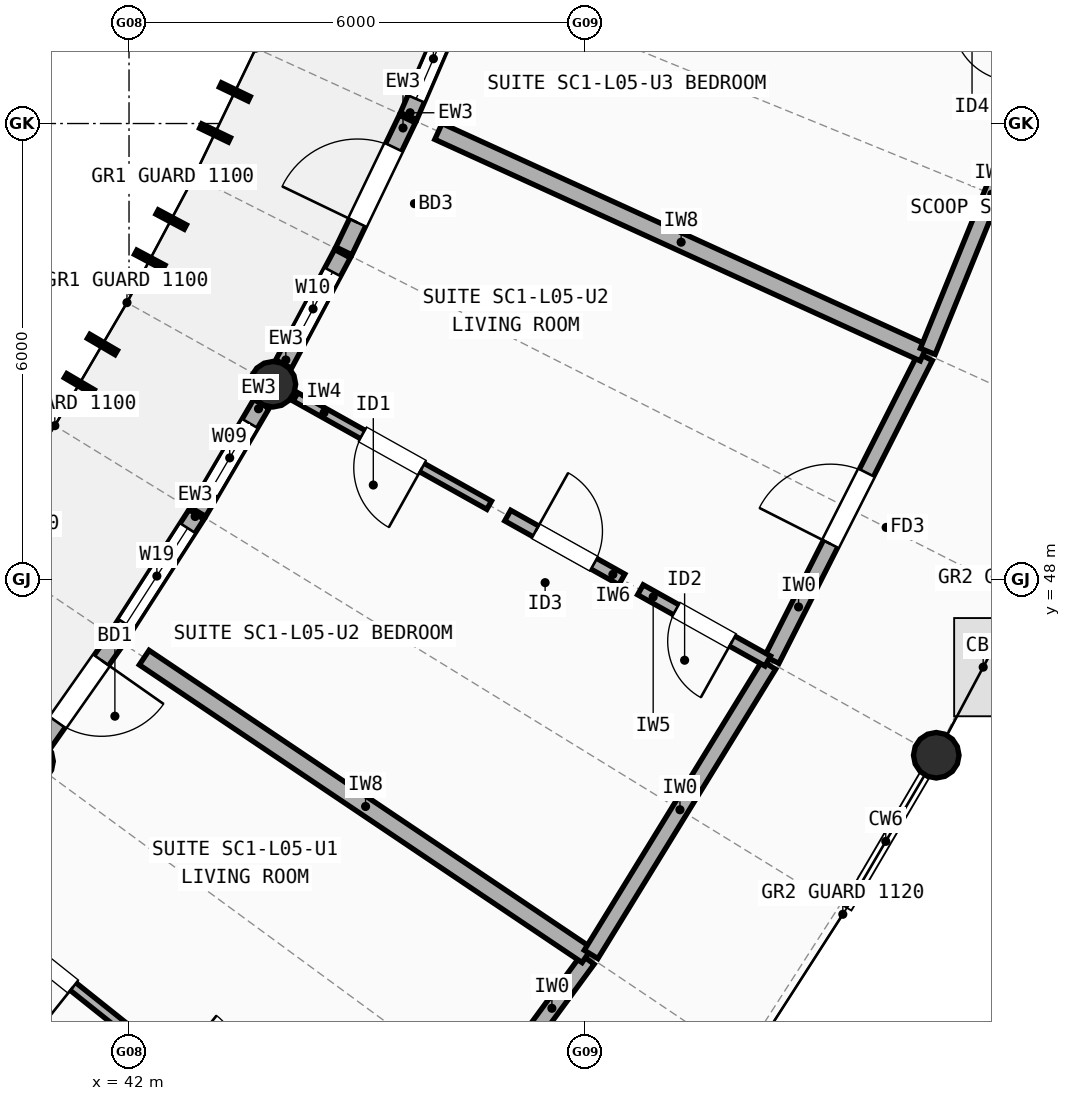
"""IFC4 building model, lengths in metres.
Left out: names, types, materials, properties, quantities, classifications, styles, units other than length and angle.
Written with IfcOpenShell. Run it as: python <this file> out.ifc"""

import sys

from ifc_helpers import new_model, si_unit, direction, frame, frame_2d, origin, origin_2d, place, context, subcontext, project, spatial, rectangle, circle, extrude, element, fill, save


model = new_model("IFC4")
c1 = context("Model", 3, precision=1e-05, world=origin(), true_north=direction((0.0, 1.0)))
c2 = subcontext(c1, "Body", "Model", "MODEL_VIEW")
j1 = project(units=[si_unit("LENGTHUNIT", "METRE"), si_unit("PLANEANGLEUNIT", "RADIAN")], contexts=[c1])
p1 = place(None, origin())
s1 = spatial("IfcSite", under=j1, at=p1, CompositionType="ELEMENT")
p2 = place(p1, origin())
s2 = spatial("IfcBuilding", under=s1, at=p2, CompositionType="ELEMENT")
p3 = place(p2, frame((0.0, 0.0, 17.3)))
s3 = spatial("IfcBuildingStorey", under=s2, at=p3, CompositionType="ELEMENT", Elevation=17.3)
for number, where, z_axis, x_axis in (
    (1, (40.704, 45.61, 0.0), (0.0, 0.0, 1.0), (1.0, 0.0, 0.0)),
    (2, (43.893, 50.57, 0.0), (0.0, 0.0, 1.0), (1.0, 0.0, 0.0)),
    (3, (52.621, 45.689, 0.0), (0.0, 0.0, 1.0), (1.0, 0.0, 0.0)),
):
    element("IfcColumn", number, at=place(p3, frame(where, z_axis=z_axis, x_axis=x_axis)), inside=s3, PredefinedType="COLUMN", context=c2, shape_type="SweptSolid", body=[
        extrude(circle(Radius=0.3, at=origin_2d()), origin(), (0.0, 0.0, 1.0), 2.94),
    ])
p4 = place(p3, frame((40.876, 45.855, 0.0), z_axis=(0.0, 0.0, 1.0), x_axis=(0.574755063072, 0.818325496043, 0.0)))
e4 = element("IfcWall", 4, at=p4, inside=s3, PredefinedType="STANDARD", context=c2, shape_type="SweptSolid", body=[
    extrude(rectangle(XDim=1.647, YDim=0.235, at=frame_2d((0.823, 0.0))), origin(), (0.0, 0.0, 1.0), 2.676),
])
p5 = place(p4, frame((0.323, 0.0, 0.0)))
e5 = element("IfcOpeningElement", 5, at=p5, cuts=e4, PredefinedType="OPENING", context=c2, shape_type="SweptSolid", body=[
    extrude(rectangle(XDim=1.0, YDim=2.15, at=frame_2d((0.5, 1.075))), frame((0.0, 0.127, 0.0), z_axis=(0.0, -1.0, 0.0), x_axis=(1.0, 0.0, 0.0)), (0.0, 0.0, 1.0), 0.255),
])
p6 = place(p3, frame((41.845, 47.236, 0.0), z_axis=(0.0, 0.0, 1.0), x_axis=(0.540911277163, 0.841079657486, 0.0)))
e6 = element("IfcWall", 6, at=p6, inside=s3, PredefinedType="STANDARD", context=c2, shape_type="SweptSolid", body=[
    extrude(rectangle(XDim=1.927, YDim=0.235, at=frame_2d((0.963, 0.0))), origin(), (0.0, 0.0, 1.0), 2.676),
])
p7 = place(p6, frame((0.213, 0.0, 0.85)))
e7 = element("IfcOpeningElement", 7, at=p7, cuts=e6, PredefinedType="OPENING", context=c2, shape_type="SweptSolid", body=[
    extrude(rectangle(XDim=1.5, YDim=1.5, at=frame_2d((0.75, 0.75))), frame((0.0, 0.127, 0.0), z_axis=(0.0, -1.0, 0.0), x_axis=(1.0, 0.0, 0.0)), (0.0, 0.0, 1.0), 0.255),
])
p8 = place(p3, frame((42.908, 48.891, 0.0), z_axis=(0.0, 0.0, 1.0), x_axis=(0.505879302059, 0.862604272971, 0.0)))
e8 = element("IfcWall", 8, at=p8, inside=s3, PredefinedType="STANDARD", context=c2, shape_type="SweptSolid", body=[
    extrude(rectangle(XDim=1.647, YDim=0.235, at=frame_2d((0.823, 0.0))), origin(), (0.0, 0.0, 1.0), 2.676),
])
p9 = place(p8, frame((0.298, 0.0, 0.85)))
e9 = element("IfcOpeningElement", 9, at=p9, cuts=e8, PredefinedType="OPENING", context=c2, shape_type="SweptSolid", body=[
    extrude(rectangle(XDim=1.05, YDim=1.35, at=frame_2d((0.525, 0.675))), frame((0.0, 0.127, 0.0), z_axis=(0.0, -1.0, 0.0), x_axis=(1.0, 0.0, 0.0)), (0.0, 0.0, 1.0), 0.255),
])
p10 = place(p3, frame((44.034, 50.835, 0.0), z_axis=(0.0, 0.0, 1.0), x_axis=(0.470134157171, 0.882594966143, 0.0)))
e10 = element("IfcWall", 10, at=p10, inside=s3, PredefinedType="STANDARD", context=c2, shape_type="SweptSolid", body=[
    extrude(rectangle(XDim=1.647, YDim=0.235, at=frame_2d((0.823, 0.0))), origin(), (0.0, 0.0, 1.0), 2.676),
])
p11 = place(p10, frame((0.273, 0.0, 0.85)))
e11 = element("IfcOpeningElement", 11, at=p11, cuts=e10, PredefinedType="OPENING", context=c2, shape_type="SweptSolid", body=[
    extrude(rectangle(XDim=1.1, YDim=1.45, at=frame_2d((0.55, 0.725))), frame((0.0, 0.127, 0.0), z_axis=(0.0, -1.0, 0.0), x_axis=(1.0, 0.0, 0.0)), (0.0, 0.0, 1.0), 0.255),
])
p12 = place(p3, frame((44.826, 52.324, 0.0), z_axis=(0.0, 0.0, 1.0), x_axis=(0.433579410465, 0.90111536155, 0.0)))
e12 = element("IfcWall", 12, at=p12, inside=s3, PredefinedType="STANDARD", context=c2, shape_type="SweptSolid", body=[
    extrude(rectangle(XDim=1.927, YDim=0.235, at=frame_2d((0.963, 0.0))), origin(), (0.0, 0.0, 1.0), 2.676),
])
p13 = place(p12, frame((0.413, 0.0, 0.0)))
e13 = element("IfcOpeningElement", 13, at=p13, cuts=e12, PredefinedType="OPENING", context=c2, shape_type="SweptSolid", body=[
    extrude(rectangle(XDim=1.1, YDim=2.15, at=frame_2d((0.55, 1.075))), frame((0.0, 0.127, 0.0), z_axis=(0.0, -1.0, 0.0), x_axis=(1.0, 0.0, 0.0)), (0.0, 0.0, 1.0), 0.255),
])
p14 = place(p3, frame((45.678, 54.097, 0.0), z_axis=(0.0, 0.0, 1.0), x_axis=(0.396333765494, 0.918106500538, 0.0)))
e14 = element("IfcWall", 14, at=p14, inside=s3, PredefinedType="STANDARD", context=c2, shape_type="SweptSolid", body=[
    extrude(rectangle(XDim=1.646, YDim=0.235, at=frame_2d((0.823, 0.0))), origin(), (0.0, 0.0, 1.0), 2.676),
])
p15 = place(p14, frame((0.248, 0.0, 0.85)))
e15 = element("IfcOpeningElement", 15, at=p15, cuts=e14, PredefinedType="OPENING", context=c2, shape_type="SweptSolid", body=[
    extrude(rectangle(XDim=1.15, YDim=1.45, at=frame_2d((0.575, 0.725))), frame((0.0, 0.127, 0.0), z_axis=(0.0, -1.0, 0.0), x_axis=(1.0, 0.0, 0.0)), (0.0, 0.0, 1.0), 0.255),
])
p16 = place(p3, frame((45.393, 39.4, 0.0), z_axis=(0.0, 0.0, 1.0), x_axis=(0.591475021239, 0.806323321783, 0.0)))
e16 = element("IfcWall", 16, at=p16, inside=s3, PredefinedType="SOLIDWALL", context=c2, shape_type="SweptSolid", body=[
    extrude(rectangle(XDim=4.467, YDim=0.21, at=frame_2d((2.233, 0.0))), origin(), (0.0, 0.0, 1.0), 2.734),
])
p17 = place(p16, frame((1.743, 0.0, 0.0)))
e17 = element("IfcOpeningElement", 17, at=p17, cuts=e16, PredefinedType="OPENING", context=c2, shape_type="SweptSolid", body=[
    extrude(rectangle(XDim=0.98, YDim=2.15, at=frame_2d((0.49, 1.075))), frame((0.0, 0.115, 0.0), z_axis=(0.0, -1.0, 0.0), x_axis=(1.0, 0.0, 0.0)), (0.0, 0.0, 1.0), 0.23),
])
p18 = place(p3, frame((39.774, 43.836, 0.0), z_axis=(0.0, 0.0, 1.0), x_axis=(0.781431339385, -0.623991235377, 0.0)))
e18 = element("IfcWall", 18, at=p18, inside=s3, PredefinedType="PARTITIONING", context=c2, shape_type="SweptSolid", body=[
    extrude(rectangle(XDim=2.92, YDim=0.125, at=frame_2d((1.46, 0.0))), origin(), (0.0, 0.0, 1.0), 2.714),
])
p19 = place(p18, frame((1.01, 0.0, 0.0)))
e19 = element("IfcOpeningElement", 19, at=p19, cuts=e18, PredefinedType="OPENING", context=c2, shape_type="SweptSolid", body=[
    extrude(rectangle(XDim=0.9, YDim=2.1, at=frame_2d((0.45, 1.05))), frame((0.0, 0.073, 0.0), z_axis=(0.0, -1.0, 0.0), x_axis=(1.0, 0.0, 0.0)), (0.0, 0.0, 1.0), 0.145),
])
p20 = place(p3, frame((42.2, 46.974, 0.0), z_axis=(0.0, 0.0, 1.0), x_axis=(0.82987699708, -0.55794638606, 0.0)))
e20 = element("IfcWall", 20, at=p20, inside=s3, PredefinedType="SOLIDWALL", context=c2, shape_type="SweptSolid", body=[
    extrude(rectangle(XDim=7.02, YDim=0.23, at=frame_2d((3.51, 0.0))), origin(), (0.0, 0.0, 1.0), 2.754),
])
p21 = place(p3, frame((48.08, 43.069, 0.0), z_axis=(0.0, 0.0, 1.0), x_axis=(0.523444746739, 0.852059620632, 0.0)))
e21 = element("IfcWall", 21, at=p21, inside=s3, PredefinedType="SOLIDWALL", context=c2, shape_type="SweptSolid", body=[
    extrude(rectangle(XDim=4.467, YDim=0.21, at=frame_2d((2.234, 0.0))), origin(), (0.0, 0.0, 1.0), 2.714),
])
p22 = place(p3, frame((50.457, 46.945, 0.0), z_axis=(0.0, 0.0, 1.0), x_axis=(0.451972910967, 0.892031662976, 0.0)))
e22 = element("IfcWall", 22, at=p22, inside=s3, PredefinedType="SOLIDWALL", context=c2, shape_type="SweptSolid", body=[
    extrude(rectangle(XDim=4.467, YDim=0.21, at=frame_2d((2.234, 0.0))), origin(), (0.0, 0.0, 1.0), 2.754),
])
p23 = place(p22, frame((1.708, 0.0, 0.0)))
e23 = element("IfcOpeningElement", 23, at=p23, cuts=e22, PredefinedType="OPENING", context=c2, shape_type="SweptSolid", body=[
    extrude(rectangle(XDim=1.05, YDim=2.15, at=frame_2d((0.525, 1.075))), frame((0.0, 0.115, 0.0), z_axis=(0.0, -1.0, 0.0), x_axis=(1.0, 0.0, 0.0)), (0.0, 0.0, 1.0), 0.23),
])
p24 = place(p3, frame((44.19, 50.404, 0.0), z_axis=(0.0, 0.0, 1.0), x_axis=(0.872785313841, -0.488104287978, 0.0)))
e24 = element("IfcWall", 24, at=p24, inside=s3, PredefinedType="PARTITIONING", context=c2, shape_type="SweptSolid", body=[
    extrude(rectangle(XDim=2.92, YDim=0.125, at=frame_2d((1.46, 0.0))), origin(), (0.0, 0.0, 1.0), 2.734),
])
p25 = place(p24, frame((1.01, 0.0, 0.0)))
e25 = element("IfcOpeningElement", 25, at=p25, cuts=e24, PredefinedType="OPENING", context=c2, shape_type="SweptSolid", body=[
    extrude(rectangle(XDim=0.9, YDim=2.1, at=frame_2d((0.45, 1.05))), frame((0.0, 0.073, 0.0), z_axis=(0.0, -1.0, 0.0), x_axis=(1.0, 0.0, 0.0)), (0.0, 0.0, 1.0), 0.145),
])
p26 = place(p3, frame((46.983, 48.842, 0.0), z_axis=(0.0, 0.0, 1.0), x_axis=(0.872774545553, -0.48812354239, 0.0)))
e26 = element("IfcWall", 26, at=p26, inside=s3, PredefinedType="PLUMBINGWALL", context=c2, shape_type="SweptSolid", body=[
    extrude(rectangle(XDim=1.72, YDim=0.16, at=frame_2d((0.86, 0.0))), origin(), (0.0, 0.0, 1.0), 2.734),
])
p27 = place(p26, frame((0.42, 0.0, 0.0)))
e27 = element("IfcOpeningElement", 27, at=p27, cuts=e26, PredefinedType="OPENING", context=c2, shape_type="SweptSolid", body=[
    extrude(rectangle(XDim=0.88, YDim=2.1, at=frame_2d((0.44, 1.05))), frame((0.0, 0.09, 0.0), z_axis=(0.0, -1.0, 0.0), x_axis=(1.0, 0.0, 0.0)), (0.0, 0.0, 1.0), 0.18),
])
p28 = place(p3, frame((48.728, 47.866, 0.0), z_axis=(0.0, 0.0, 1.0), x_axis=(0.8728224149, -0.488037941198, 0.0)))
e28 = element("IfcWall", 28, at=p28, inside=s3, PredefinedType="PARTITIONING", context=c2, shape_type="SweptSolid", body=[
    extrude(rectangle(XDim=1.92, YDim=0.15, at=frame_2d((0.96, 0.0))), origin(), (0.0, 0.0, 1.0), 2.734),
])
p29 = place(p28, frame((0.535, 0.0, 0.0)))
e29 = element("IfcOpeningElement", 29, at=p29, cuts=e28, PredefinedType="OPENING", context=c2, shape_type="SweptSolid", body=[
    extrude(rectangle(XDim=0.85, YDim=2.1, at=frame_2d((0.425, 1.05))), frame((0.0, 0.085, 0.0), z_axis=(0.0, -1.0, 0.0), x_axis=(1.0, 0.0, 0.0)), (0.0, 0.0, 1.0), 0.17),
])
p30 = place(p3, frame((46.071, 53.896, 0.0), z_axis=(0.0, 0.0, 1.0), x_axis=(0.909807068599, -0.415031442095, 0.0)))
e30 = element("IfcWall", 30, at=p30, inside=s3, PredefinedType="SOLIDWALL", context=c2, shape_type="SweptSolid", body=[
    extrude(rectangle(XDim=7.02, YDim=0.23, at=frame_2d((3.51, 0.0))), origin(), (0.0, 0.0, 1.0), 2.714),
])
p31 = place(p3, frame((52.509, 51.002, 0.0), z_axis=(0.0, 0.0, 1.0), x_axis=(0.377413192487, 0.926044967665, 0.0)))
e31 = element("IfcWall", 31, at=p31, inside=s3, PredefinedType="SOLIDWALL", context=c2, shape_type="SweptSolid", body=[
    extrude(rectangle(XDim=4.467, YDim=0.21, at=frame_2d((2.234, 0.0))), origin(), (0.0, 0.0, 1.0), 2.734),
])
p32 = place(p5, origin())
e32 = element("IfcDoor", 32, at=p32, inside=s3, OperationType="SINGLE_SWING_RIGHT", PredefinedType="DOOR", context=c2, shape_type="SweptSolid", body=[
    extrude(rectangle(XDim=1.0, YDim=2.15, at=frame_2d((0.5, 1.075))), frame((0.0, 0.025, 0.0), z_axis=(0.0, -1.0, 0.0), x_axis=(1.0, 0.0, 0.0)), (0.0, 0.0, 1.0), 0.05),
])
fill(e5, e32)
p33 = place(p7, origin())
e33 = element("IfcWindow", 33, at=p33, inside=s3, PartitioningType="SINGLE_PANEL", PredefinedType="WINDOW", context=c2, shape_type="SweptSolid", body=[
    extrude(rectangle(XDim=1.5, YDim=1.5, at=frame_2d((0.75, 0.75))), frame((0.0, 0.03, 0.0), z_axis=(0.0, -1.0, 0.0), x_axis=(1.0, 0.0, 0.0)), (0.0, 0.0, 1.0), 0.06),
])
fill(e7, e33)
p34 = place(p9, origin())
e34 = element("IfcWindow", 34, at=p34, inside=s3, PartitioningType="SINGLE_PANEL", PredefinedType="WINDOW", context=c2, shape_type="SweptSolid", body=[
    extrude(rectangle(XDim=1.05, YDim=1.35, at=frame_2d((0.525, 0.675))), frame((0.0, 0.03, 0.0), z_axis=(0.0, -1.0, 0.0), x_axis=(1.0, 0.0, 0.0)), (0.0, 0.0, 1.0), 0.06),
])
fill(e9, e34)
p35 = place(p11, origin())
e35 = element("IfcWindow", 35, at=p35, inside=s3, PartitioningType="SINGLE_PANEL", PredefinedType="WINDOW", context=c2, shape_type="SweptSolid", body=[
    extrude(rectangle(XDim=1.1, YDim=1.45, at=frame_2d((0.55, 0.725))), frame((0.0, 0.03, 0.0), z_axis=(0.0, -1.0, 0.0), x_axis=(1.0, 0.0, 0.0)), (0.0, 0.0, 1.0), 0.06),
])
fill(e11, e35)
p36 = place(p13, origin())
e36 = element("IfcDoor", 36, at=p36, inside=s3, OperationType="SINGLE_SWING_LEFT", PredefinedType="DOOR", context=c2, shape_type="SweptSolid", body=[
    extrude(rectangle(XDim=1.1, YDim=2.15, at=frame_2d((0.55, 1.075))), frame((0.0, 0.025, 0.0), z_axis=(0.0, -1.0, 0.0), x_axis=(1.0, 0.0, 0.0)), (0.0, 0.0, 1.0), 0.05),
])
fill(e13, e36)
p37 = place(p15, origin())
e37 = element("IfcWindow", 37, at=p37, inside=s3, PartitioningType="SINGLE_PANEL", PredefinedType="WINDOW", context=c2, shape_type="SweptSolid", body=[
    extrude(rectangle(XDim=1.15, YDim=1.45, at=frame_2d((0.575, 0.725))), frame((0.0, 0.03, 0.0), z_axis=(0.0, -1.0, 0.0), x_axis=(1.0, 0.0, 0.0)), (0.0, 0.0, 1.0), 0.06),
])
fill(e15, e37)
p38 = place(p19, origin())
e38 = element("IfcDoor", 38, at=p38, inside=s3, OperationType="SINGLE_SWING_RIGHT", PredefinedType="DOOR", context=c2, shape_type="SweptSolid", body=[
    extrude(rectangle(XDim=0.9, YDim=2.1, at=frame_2d((0.45, 1.05))), frame((0.0, 0.025, 0.0), z_axis=(0.0, -1.0, 0.0), x_axis=(1.0, 0.0, 0.0)), (0.0, 0.0, 1.0), 0.05),
])
fill(e19, e38)
p39 = place(p23, origin())
e39 = element("IfcDoor", 39, at=p39, inside=s3, OperationType="SINGLE_SWING_LEFT", PredefinedType="DOOR", context=c2, shape_type="SweptSolid", body=[
    extrude(rectangle(XDim=1.05, YDim=2.15, at=frame_2d((0.525, 1.075))), frame((0.0, 0.025, 0.0), z_axis=(0.0, -1.0, 0.0), x_axis=(1.0, 0.0, 0.0)), (0.0, 0.0, 1.0), 0.05),
])
fill(e23, e39)
p40 = place(p25, origin())
e40 = element("IfcDoor", 40, at=p40, inside=s3, OperationType="SINGLE_SWING_RIGHT", PredefinedType="DOOR", context=c2, shape_type="SweptSolid", body=[
    extrude(rectangle(XDim=0.9, YDim=2.1, at=frame_2d((0.45, 1.05))), frame((0.0, 0.025, 0.0), z_axis=(0.0, -1.0, 0.0), x_axis=(1.0, 0.0, 0.0)), (0.0, 0.0, 1.0), 0.05),
])
fill(e25, e40)
p41 = place(p27, origin())
e41 = element("IfcDoor", 41, at=p41, inside=s3, OperationType="SINGLE_SWING_LEFT", PredefinedType="DOOR", context=c2, shape_type="SweptSolid", body=[
    extrude(rectangle(XDim=0.88, YDim=2.1, at=frame_2d((0.44, 1.05))), frame((0.0, 0.025, 0.0), z_axis=(0.0, -1.0, 0.0), x_axis=(1.0, 0.0, 0.0)), (0.0, 0.0, 1.0), 0.05),
])
fill(e27, e41)
p42 = place(p29, origin())
e42 = element("IfcDoor", 42, at=p42, inside=s3, OperationType="SINGLE_SWING_RIGHT", PredefinedType="DOOR", context=c2, shape_type="SweptSolid", body=[
    extrude(rectangle(XDim=0.85, YDim=2.1, at=frame_2d((0.425, 1.05))), frame((0.0, 0.025, 0.0), z_axis=(0.0, -1.0, 0.0), x_axis=(1.0, 0.0, 0.0)), (0.0, 0.0, 1.0), 0.05),
])
fill(e29, e42)
save(model, sys.argv[1])
